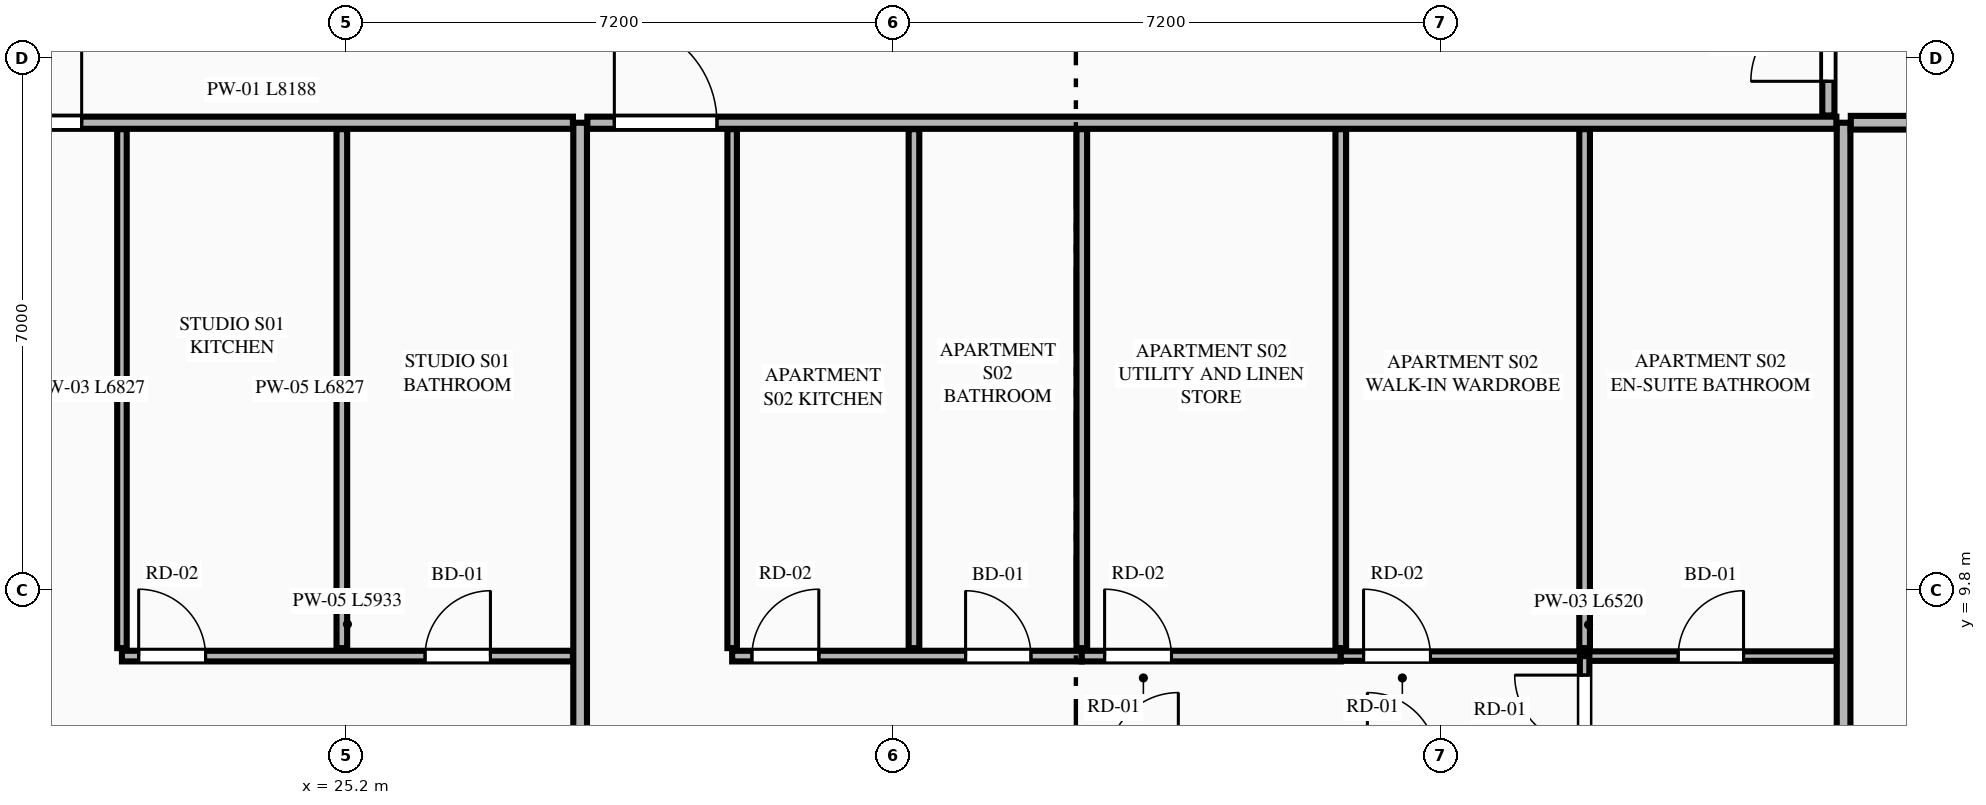
"""IFC4 building model, lengths in metres.
Left out: names, types, materials, properties, quantities, classifications, styles, units other than length and angle.
Written with IfcOpenShell. Run it as: python <this file> out.ifc"""

import sys

from ifc_helpers import new_model, si_unit, direction, frame, frame_2d, origin, place, context, subcontext, project, spatial, rectangle, extrude, element, fill, save


model = new_model("IFC4")
c1 = context("Model", 3, precision=1e-05, world=origin(), true_north=direction((0.0, 1.0)))
c2 = subcontext(c1, "Body", "Model", "MODEL_VIEW")
j1 = project(units=[si_unit("LENGTHUNIT", "METRE"), si_unit("PLANEANGLEUNIT", "RADIAN")], contexts=[c1])
p1 = place(None, origin())
s1 = spatial("IfcSite", under=j1, at=p1, CompositionType="ELEMENT")
p2 = place(p1, origin())
s2 = spatial("IfcBuilding", under=s1, at=p2, CompositionType="ELEMENT")
p3 = place(p2, frame((0.0, 0.0, 28.45)))
s3 = spatial("IfcBuildingStorey", under=s2, at=p3, CompositionType="ELEMENT", Elevation=28.45)
p4 = place(p3, frame((28.278, 2.455, 0.0), z_axis=(0.0, 0.0, 1.0), x_axis=(0.0, 1.0, 0.0)))
e1 = element("IfcWall", 1, at=p4, inside=s3, PredefinedType="PARTITIONING", context=c2, shape_type="SweptSolid", body=[
    extrude(rectangle(XDim=13.495, YDim=0.18, at=frame_2d((6.748, 0.0))), origin(), (0.0, 0.0, 1.0), 2.7),
])
p5 = place(p3, frame((44.9, 2.455, 0.0), z_axis=(0.0, 0.0, 1.0), x_axis=(0.0, 1.0, 0.0)))
e2 = element("IfcWall", 2, at=p5, inside=s3, PredefinedType="PARTITIONING", context=c2, shape_type="SweptSolid", body=[
    extrude(rectangle(XDim=13.495, YDim=0.18, at=frame_2d((6.748, 0.0))), origin(), (0.0, 0.0, 1.0), 3.33),
])
p6 = place(p3, frame((19.995, 15.95, 0.0), z_axis=(0.0, 0.0, 1.0), x_axis=(1.0, 0.0, 0.0)))
e3 = element("IfcWall", 3, at=p6, inside=s3, PredefinedType="PARTITIONING", context=c2, shape_type="SweptSolid", body=[
    extrude(rectangle(XDim=8.188, YDim=0.16, at=frame_2d((4.094, 0.0))), origin(), (0.0, 0.0, 1.0), 3.33),
])
p7 = place(p6, frame((0.705, 0.0, 0.0)))
e4 = element("IfcOpeningElement", 4, at=p7, cuts=e3, PredefinedType="OPENING", context=c2, shape_type="SweptSolid", body=[
    extrude(rectangle(XDim=1.02, YDim=2.25, at=frame_2d((0.51, 1.125))), frame((0.0, 0.09, 0.0), z_axis=(0.0, -1.0, 0.0), x_axis=(1.0, 0.0, 0.0)), (0.0, 0.0, 1.0), 0.18),
])
p8 = place(p3, frame((22.25, 9.038, 0.0), z_axis=(0.0, 0.0, 1.0), x_axis=(0.0, 1.0, 0.0)))
e5 = element("IfcWall", 5, at=p8, inside=s3, PredefinedType="PARTITIONING", context=c2, shape_type="SweptSolid", body=[
    extrude(rectangle(XDim=6.827, YDim=0.125, at=frame_2d((3.414, 0.0))), origin(), (0.0, 0.0, 1.0), 2.7),
])
p9 = place(p3, frame((22.25, 8.933, 0.0), z_axis=(0.0, 0.0, 1.0), x_axis=(1.0, 0.0, 0.0)))
e6 = element("IfcWall", 6, at=p9, inside=s3, PredefinedType="PLUMBINGWALL", context=c2, shape_type="SweptSolid", body=[
    extrude(rectangle(XDim=5.933, YDim=0.14, at=frame_2d((2.967, 0.0))), origin(), (0.0, 0.0, 1.0), 3.33),
])
p10 = place(p9, frame((3.988, 0.0, 0.0)))
e7 = element("IfcOpeningElement", 7, at=p10, cuts=e6, PredefinedType="OPENING", context=c2, shape_type="SweptSolid", body=[
    extrude(rectangle(XDim=0.86, YDim=2.1, at=frame_2d((0.43, 1.05))), frame((0.0, 0.08, 0.0), z_axis=(0.0, -1.0, 0.0), x_axis=(1.0, 0.0, 0.0)), (0.0, 0.0, 1.0), 0.16),
])
p11 = place(p9, frame((0.22, 0.0, 0.0)))
e8 = element("IfcOpeningElement", 8, at=p11, cuts=e6, PredefinedType="OPENING", context=c2, shape_type="SweptSolid", body=[
    extrude(rectangle(XDim=0.88, YDim=2.15, at=frame_2d((0.44, 1.075))), frame((0.0, 0.08, 0.0), z_axis=(0.0, -1.0, 0.0), x_axis=(1.0, 0.0, 0.0)), (0.0, 0.0, 1.0), 0.16),
])
p12 = place(p3, frame((25.143, 9.038, 0.0), z_axis=(0.0, 0.0, 1.0), x_axis=(0.0, 1.0, 0.0)))
e9 = element("IfcWall", 9, at=p12, inside=s3, PredefinedType="PLUMBINGWALL", context=c2, shape_type="SweptSolid", body=[
    extrude(rectangle(XDim=6.827, YDim=0.14, at=frame_2d((3.414, 0.0))), origin(), (0.0, 0.0, 1.0), 3.33),
])
p13 = place(p3, frame((28.373, 15.95, 0.0), z_axis=(0.0, 0.0, 1.0), x_axis=(1.0, 0.0, 0.0)))
e10 = element("IfcWall", 10, at=p13, inside=s3, PredefinedType="PARTITIONING", context=c2, shape_type="SweptSolid", body=[
    extrude(rectangle(XDim=16.432, YDim=0.16, at=frame_2d((8.216, 0.0))), origin(), (0.0, 0.0, 1.0), 3.33),
])
p14 = place(p13, frame((0.355, 0.0, 0.0)))
e11 = element("IfcOpeningElement", 11, at=p14, cuts=e10, PredefinedType="OPENING", context=c2, shape_type="SweptSolid", body=[
    extrude(rectangle(XDim=1.35, YDim=2.35, at=frame_2d((0.675, 1.175))), frame((0.0, 0.09, 0.0), z_axis=(0.0, -1.0, 0.0), x_axis=(1.0, 0.0, 0.0)), (0.0, 0.0, 1.0), 0.18),
])
p15 = place(p3, frame((30.278, 9.038, 0.0), z_axis=(0.0, 0.0, 1.0), x_axis=(0.0, 1.0, 0.0)))
e12 = element("IfcWall", 12, at=p15, inside=s3, PredefinedType="PARTITIONING", context=c2, shape_type="SweptSolid", body=[
    extrude(rectangle(XDim=6.827, YDim=0.125, at=frame_2d((3.414, 0.0))), origin(), (0.0, 0.0, 1.0), 3.33),
])
p16 = place(p3, frame((30.278, 8.933, 0.0), z_axis=(0.0, 0.0, 1.0), x_axis=(1.0, 0.0, 0.0)))
e13 = element("IfcWall", 13, at=p16, inside=s3, PredefinedType="PLUMBINGWALL", context=c2, shape_type="SweptSolid", body=[
    extrude(rectangle(XDim=4.6, YDim=0.14, at=frame_2d((2.3, 0.0))), origin(), (0.0, 0.0, 1.0), 3.33),
])
p17 = place(p16, frame((3.071, 0.0, 0.0)))
e14 = element("IfcOpeningElement", 14, at=p17, cuts=e13, PredefinedType="OPENING", context=c2, shape_type="SweptSolid", body=[
    extrude(rectangle(XDim=0.86, YDim=2.1, at=frame_2d((0.43, 1.05))), frame((0.0, 0.08, 0.0), z_axis=(0.0, -1.0, 0.0), x_axis=(1.0, 0.0, 0.0)), (0.0, 0.0, 1.0), 0.16),
])
p18 = place(p16, frame((0.26, 0.0, 0.0)))
e15 = element("IfcOpeningElement", 15, at=p18, cuts=e13, PredefinedType="OPENING", context=c2, shape_type="SweptSolid", body=[
    extrude(rectangle(XDim=0.88, YDim=2.15, at=frame_2d((0.44, 1.075))), frame((0.0, 0.08, 0.0), z_axis=(0.0, -1.0, 0.0), x_axis=(1.0, 0.0, 0.0)), (0.0, 0.0, 1.0), 0.16),
])
p19 = place(p3, frame((34.878, 8.933, 0.0), z_axis=(0.0, 0.0, 1.0), x_axis=(1.0, 0.0, 0.0)))
e16 = element("IfcWall", 16, at=p19, inside=s3, PredefinedType="PLUMBINGWALL", context=c2, shape_type="SweptSolid", body=[
    extrude(rectangle(XDim=3.407, YDim=0.14, at=frame_2d((1.704, 0.0))), origin(), (0.0, 0.0, 1.0), 3.33),
])
p20 = place(p19, frame((0.3, 0.0, 0.0)))
e17 = element("IfcOpeningElement", 17, at=p20, cuts=e16, PredefinedType="OPENING", context=c2, shape_type="SweptSolid", body=[
    extrude(rectangle(XDim=0.88, YDim=2.15, at=frame_2d((0.44, 1.075))), frame((0.0, 0.08, 0.0), z_axis=(0.0, -1.0, 0.0), x_axis=(1.0, 0.0, 0.0)), (0.0, 0.0, 1.0), 0.16),
])
p21 = place(p3, frame((38.285, 8.933, 0.0), z_axis=(0.0, 0.0, 1.0), x_axis=(1.0, 0.0, 0.0)))
e18 = element("IfcWall", 18, at=p21, inside=s3, PredefinedType="PARTITIONING", context=c2, shape_type="SweptSolid", body=[
    extrude(rectangle(XDim=6.52, YDim=0.125, at=frame_2d((3.26, 0.0))), origin(), (0.0, 0.0, 1.0), 3.33),
])
p22 = place(p21, frame((4.439, 0.0, 0.0)))
e19 = element("IfcOpeningElement", 19, at=p22, cuts=e18, PredefinedType="OPENING", context=c2, shape_type="SweptSolid", body=[
    extrude(rectangle(XDim=0.86, YDim=2.1, at=frame_2d((0.43, 1.05))), frame((0.0, 0.073, 0.0), z_axis=(0.0, -1.0, 0.0), x_axis=(1.0, 0.0, 0.0)), (0.0, 0.0, 1.0), 0.145),
])
p23 = place(p21, frame((0.3, 0.0, 0.0)))
e20 = element("IfcOpeningElement", 20, at=p23, cuts=e18, PredefinedType="OPENING", context=c2, shape_type="SweptSolid", body=[
    extrude(rectangle(XDim=0.88, YDim=2.15, at=frame_2d((0.44, 1.075))), frame((0.0, 0.073, 0.0), z_axis=(0.0, -1.0, 0.0), x_axis=(1.0, 0.0, 0.0)), (0.0, 0.0, 1.0), 0.145),
])
p24 = place(p3, frame((32.67, 9.038, 0.0), z_axis=(0.0, 0.0, 1.0), x_axis=(0.0, 1.0, 0.0)))
e21 = element("IfcWall", 21, at=p24, inside=s3, PredefinedType="PLUMBINGWALL", context=c2, shape_type="SweptSolid", body=[
    extrude(rectangle(XDim=6.827, YDim=0.14, at=frame_2d((3.414, 0.0))), origin(), (0.0, 0.0, 1.0), 3.33),
])
p25 = place(p3, frame((41.493, 7.603, 0.0), z_axis=(0.0, 0.0, 1.0), x_axis=(0.0, 1.0, 0.0)))
e22 = element("IfcWall", 22, at=p25, inside=s3, PredefinedType="PARTITIONING", context=c2, shape_type="SweptSolid", body=[
    extrude(rectangle(XDim=1.33, YDim=0.125, at=frame_2d((0.665, 0.0))), origin(), (0.0, 0.0, 1.0), 3.33),
])
p26 = place(p25, frame((0.16, 0.0, 0.0)))
e23 = element("IfcOpeningElement", 23, at=p26, cuts=e22, PredefinedType="OPENING", context=c2, shape_type="SweptSolid", body=[
    extrude(rectangle(XDim=0.92, YDim=2.15, at=frame_2d((0.46, 1.075))), frame((0.0, 0.073, 0.0), z_axis=(0.0, -1.0, 0.0), x_axis=(1.0, 0.0, 0.0)), (0.0, 0.0, 1.0), 0.145),
])
for number, where, z_axis, x_axis in (
    (24, (34.878, 9.038, 0.0), (0.0, 0.0, 1.0), (0.0, 1.0, 0.0)),
    (25, (38.285, 9.038, 0.0), (0.0, 0.0, 1.0), (0.0, 1.0, 0.0)),
    (26, (41.493, 9.038, 0.0), (0.0, 0.0, 1.0), (0.0, 1.0, 0.0)),
):
    element("IfcWall", number, at=place(p3, frame(where, z_axis=z_axis, x_axis=x_axis)), inside=s3, PredefinedType="PLUMBINGWALL", context=c2, shape_type="SweptSolid", body=[
        extrude(rectangle(XDim=6.827, YDim=0.14, at=frame_2d((3.414, 0.0))), origin(), (0.0, 0.0, 1.0), 3.33),
    ])
p27 = place(p3, frame((44.995, 15.95, 0.0), z_axis=(0.0, 0.0, 1.0), x_axis=(1.0, 0.0, 0.0)))
e27 = element("IfcWall", 27, at=p27, inside=s3, PredefinedType="PARTITIONING", context=c2, shape_type="SweptSolid", body=[
    extrude(rectangle(XDim=9.241, YDim=0.18, at=frame_2d((4.621, 0.0))), origin(), (0.0, 0.0, 1.0), 3.33),
])
p28 = place(p3, frame((44.7, 16.045, 0.0), z_axis=(0.0, 0.0, 1.0), x_axis=(0.0, 1.0, 0.0)))
e28 = element("IfcWall", 28, at=p28, inside=s3, PredefinedType="PARTITIONING", context=c2, shape_type="SweptSolid", body=[
    extrude(rectangle(XDim=19.71, YDim=0.16, at=frame_2d((9.855, 0.0))), origin(), (0.0, 0.0, 1.0), 2.7),
])
p29 = place(p28, frame((0.45, 0.0, 0.0)))
e29 = element("IfcOpeningElement", 29, at=p29, cuts=e28, PredefinedType="OPENING", context=c2, shape_type="SweptSolid", body=[
    extrude(rectangle(XDim=1.02, YDim=2.25, at=frame_2d((0.51, 1.125))), frame((0.0, 0.09, 0.0), z_axis=(0.0, -1.0, 0.0), x_axis=(1.0, 0.0, 0.0)), (0.0, 0.0, 1.0), 0.18),
])
p30 = place(p10, origin())
e30 = element("IfcDoor", 30, at=p30, inside=s3, OperationType="SINGLE_SWING_RIGHT", PredefinedType="DOOR", context=c2, shape_type="SweptSolid", body=[
    extrude(rectangle(XDim=0.86, YDim=2.1, at=frame_2d((0.43, 1.05))), frame((0.0, 0.025, 0.0), z_axis=(0.0, -1.0, 0.0), x_axis=(1.0, 0.0, 0.0)), (0.0, 0.0, 1.0), 0.05),
])
fill(e7, e30)
p31 = place(p7, origin())
e31 = element("IfcDoor", 31, at=p31, inside=s3, OperationType="SINGLE_SWING_RIGHT", PredefinedType="DOOR", context=c2, shape_type="SweptSolid", body=[
    extrude(rectangle(XDim=1.02, YDim=2.25, at=frame_2d((0.51, 1.125))), frame((0.0, 0.025, 0.0), z_axis=(0.0, -1.0, 0.0), x_axis=(1.0, 0.0, 0.0)), (0.0, 0.0, 1.0), 0.05),
])
fill(e4, e31)
p32 = place(p11, origin())
e32 = element("IfcDoor", 32, at=p32, inside=s3, OperationType="SINGLE_SWING_LEFT", PredefinedType="DOOR", context=c2, shape_type="SweptSolid", body=[
    extrude(rectangle(XDim=0.88, YDim=2.15, at=frame_2d((0.44, 1.075))), frame((0.0, 0.025, 0.0), z_axis=(0.0, -1.0, 0.0), x_axis=(1.0, 0.0, 0.0)), (0.0, 0.0, 1.0), 0.05),
])
fill(e8, e32)
p33 = place(p17, origin())
e33 = element("IfcDoor", 33, at=p33, inside=s3, OperationType="SINGLE_SWING_LEFT", PredefinedType="DOOR", context=c2, shape_type="SweptSolid", body=[
    extrude(rectangle(XDim=0.86, YDim=2.1, at=frame_2d((0.43, 1.05))), frame((0.0, 0.025, 0.0), z_axis=(0.0, -1.0, 0.0), x_axis=(1.0, 0.0, 0.0)), (0.0, 0.0, 1.0), 0.05),
])
fill(e14, e33)
p34 = place(p22, origin())
e34 = element("IfcDoor", 34, at=p34, inside=s3, OperationType="SINGLE_SWING_RIGHT", PredefinedType="DOOR", context=c2, shape_type="SweptSolid", body=[
    extrude(rectangle(XDim=0.86, YDim=2.1, at=frame_2d((0.43, 1.05))), frame((0.0, 0.025, 0.0), z_axis=(0.0, -1.0, 0.0), x_axis=(1.0, 0.0, 0.0)), (0.0, 0.0, 1.0), 0.05),
])
fill(e19, e34)
p35 = place(p14, origin())
e35 = element("IfcDoor", 35, at=p35, inside=s3, OperationType="SINGLE_SWING_LEFT", PredefinedType="DOOR", context=c2, shape_type="SweptSolid", body=[
    extrude(rectangle(XDim=1.35, YDim=2.35, at=frame_2d((0.675, 1.175))), frame((0.0, 0.025, 0.0), z_axis=(0.0, -1.0, 0.0), x_axis=(1.0, 0.0, 0.0)), (0.0, 0.0, 1.0), 0.05),
])
fill(e11, e35)
p36 = place(p18, origin())
e36 = element("IfcDoor", 36, at=p36, inside=s3, OperationType="SINGLE_SWING_RIGHT", PredefinedType="DOOR", context=c2, shape_type="SweptSolid", body=[
    extrude(rectangle(XDim=0.88, YDim=2.15, at=frame_2d((0.44, 1.075))), frame((0.0, 0.025, 0.0), z_axis=(0.0, -1.0, 0.0), x_axis=(1.0, 0.0, 0.0)), (0.0, 0.0, 1.0), 0.05),
])
fill(e15, e36)
p37 = place(p20, origin())
e37 = element("IfcDoor", 37, at=p37, inside=s3, OperationType="SINGLE_SWING_LEFT", PredefinedType="DOOR", context=c2, shape_type="SweptSolid", body=[
    extrude(rectangle(XDim=0.88, YDim=2.15, at=frame_2d((0.44, 1.075))), frame((0.0, 0.025, 0.0), z_axis=(0.0, -1.0, 0.0), x_axis=(1.0, 0.0, 0.0)), (0.0, 0.0, 1.0), 0.05),
])
fill(e17, e37)
p38 = place(p26, origin())
e38 = element("IfcDoor", 38, at=p38, inside=s3, OperationType="SINGLE_SWING_RIGHT", PredefinedType="DOOR", context=c2, shape_type="SweptSolid", body=[
    extrude(rectangle(XDim=0.92, YDim=2.15, at=frame_2d((0.46, 1.075))), frame((0.0, 0.025, 0.0), z_axis=(0.0, -1.0, 0.0), x_axis=(1.0, 0.0, 0.0)), (0.0, 0.0, 1.0), 0.05),
])
fill(e23, e38)
p39 = place(p23, origin())
e39 = element("IfcDoor", 39, at=p39, inside=s3, OperationType="SINGLE_SWING_LEFT", PredefinedType="DOOR", context=c2, shape_type="SweptSolid", body=[
    extrude(rectangle(XDim=0.88, YDim=2.15, at=frame_2d((0.44, 1.075))), frame((0.0, 0.025, 0.0), z_axis=(0.0, -1.0, 0.0), x_axis=(1.0, 0.0, 0.0)), (0.0, 0.0, 1.0), 0.05),
])
fill(e20, e39)
p40 = place(p29, origin())
e40 = element("IfcDoor", 40, at=p40, inside=s3, OperationType="SINGLE_SWING_LEFT", PredefinedType="DOOR", context=c2, shape_type="SweptSolid", body=[
    extrude(rectangle(XDim=1.02, YDim=2.25, at=frame_2d((0.51, 1.125))), frame((0.0, 0.025, 0.0), z_axis=(0.0, -1.0, 0.0), x_axis=(1.0, 0.0, 0.0)), (0.0, 0.0, 1.0), 0.05),
])
fill(e29, e40)
save(model, sys.argv[1])
